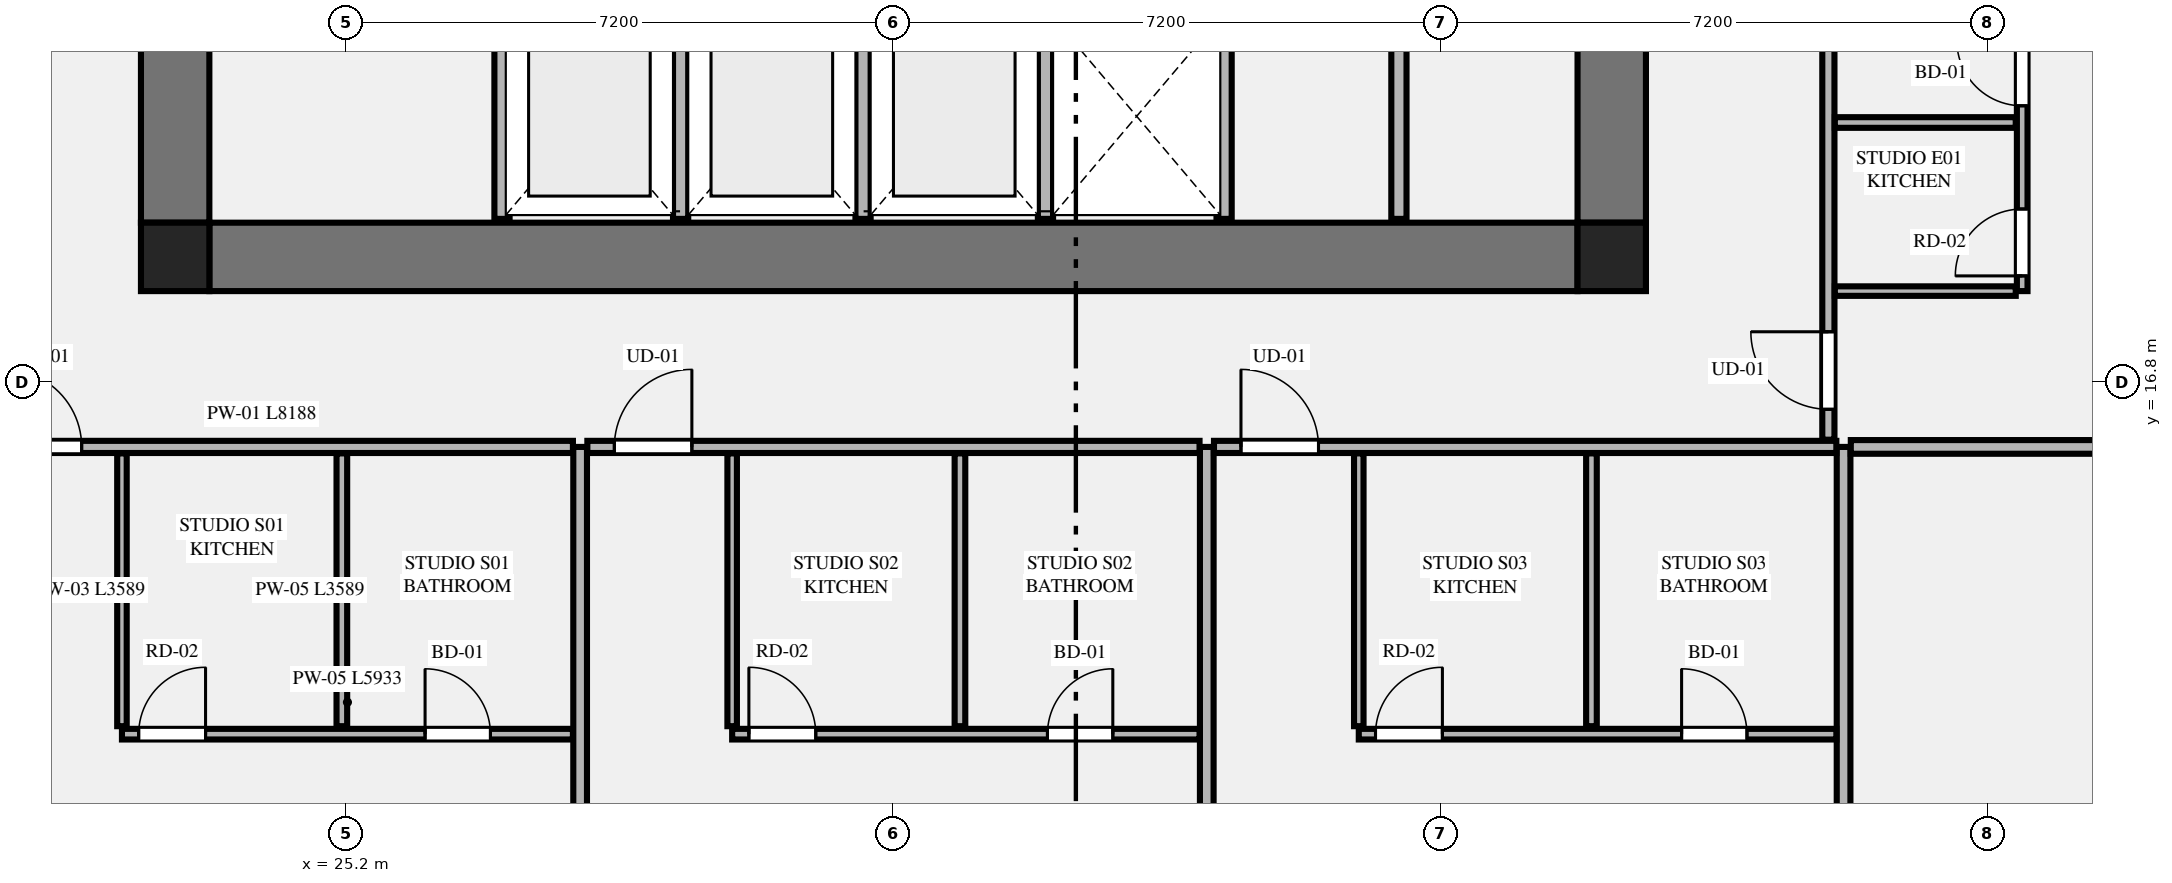
"""IFC4 building model, lengths in metres.
Left out: names, types, materials, properties, quantities, classifications, styles, units other than length and angle.
Written with IfcOpenShell. Run it as: python <this file> out.ifc"""

import sys

from ifc_helpers import new_model, si_unit, direction, frame, frame_2d, origin, origin_2d, place, context, subcontext, project, spatial, rectangle, extrude, element, fill, save


model = new_model("IFC4")
c1 = context("Model", 3, precision=1e-05, world=origin(), true_north=direction((0.0, 1.0)))
c2 = subcontext(c1, "Body", "Model", "MODEL_VIEW")
j1 = project(units=[si_unit("LENGTHUNIT", "METRE"), si_unit("PLANEANGLEUNIT", "RADIAN")], contexts=[c1])
p1 = place(None, origin())
s1 = spatial("IfcSite", under=j1, at=p1, CompositionType="ELEMENT")
p2 = place(p1, origin())
s2 = spatial("IfcBuilding", under=s1, at=p2, CompositionType="ELEMENT")
p3 = place(p2, frame((0.0, 0.0, 24.9)))
s3 = spatial("IfcBuildingStorey", under=s2, at=p3, CompositionType="ELEMENT", Elevation=24.9)
for number, where, z_axis, x_axis in (
    (1, (22.95, 18.45, 0.0), (0.0, 0.0, 1.0), (1.0, 0.0, 0.0)),
    (2, (41.85, 18.45, 0.0), (0.0, 0.0, 1.0), (1.0, 0.0, 0.0)),
):
    element("IfcColumn", number, at=place(p3, frame(where, z_axis=z_axis, x_axis=x_axis)), inside=s3, PredefinedType="COLUMN", context=c2, shape_type="SweptSolid", body=[
        extrude(rectangle(XDim=0.9, YDim=0.9, at=origin_2d()), origin(), (0.0, 0.0, 1.0), 3.55),
    ])
p4 = place(p3, frame((23.4, 18.45, 0.0), z_axis=(0.0, 0.0, 1.0), x_axis=(1.0, 0.0, 0.0)))
e3 = element("IfcWall", 3, at=p4, inside=s3, PredefinedType="SHEAR", context=c2, shape_type="SweptSolid", body=[
    extrude(rectangle(XDim=18.0, YDim=0.9, at=frame_2d((9.0, 0.0))), origin(), (0.0, 0.0, 1.0), 3.33),
])
p5 = place(p3, frame((22.95, 18.9, 0.0), z_axis=(0.0, 0.0, 1.0), x_axis=(0.0, 1.0, 0.0)))
e4 = element("IfcWall", 4, at=p5, inside=s3, PredefinedType="SHEAR", context=c2, shape_type="SweptSolid", body=[
    extrude(rectangle(XDim=14.0, YDim=0.9, at=frame_2d((7.0, 0.0))), origin(), (0.0, 0.0, 1.0), 3.33),
])
p6 = place(p5, frame((2.94, 0.0, 0.0)))
e5 = element("IfcOpeningElement", 5, at=p6, cuts=e4, PredefinedType="OPENING", context=c2, shape_type="SweptSolid", body=[
    extrude(rectangle(XDim=1.22, YDim=2.25, at=frame_2d((0.61, 1.125))), frame((0.0, 0.46, 0.0), z_axis=(0.0, -1.0, 0.0), x_axis=(1.0, 0.0, 0.0)), (0.0, 0.0, 1.0), 0.92),
])
p7 = place(p3, frame((41.85, 18.9, 0.0), z_axis=(0.0, 0.0, 1.0), x_axis=(0.0, 1.0, 0.0)))
e6 = element("IfcWall", 6, at=p7, inside=s3, PredefinedType="SHEAR", context=c2, shape_type="SweptSolid", body=[
    extrude(rectangle(XDim=14.0, YDim=0.9, at=frame_2d((7.0, 0.0))), origin(), (0.0, 0.0, 1.0), 3.33),
])
p8 = place(p7, frame((2.94, 0.0, 0.0)))
e7 = element("IfcOpeningElement", 7, at=p8, cuts=e6, PredefinedType="OPENING", context=c2, shape_type="SweptSolid", body=[
    extrude(rectangle(XDim=1.22, YDim=2.25, at=frame_2d((0.61, 1.125))), frame((0.0, 0.46, 0.0), z_axis=(0.0, -1.0, 0.0), x_axis=(1.0, 0.0, 0.0)), (0.0, 0.0, 1.0), 0.92),
])
for number, where, z_axis, x_axis in (
    (8, (27.25, 18.95, 0.0), (0.0, 0.0, 1.0), (0.0, 1.0, 0.0)),
    (9, (29.6, 18.95, 0.0), (0.0, 0.0, 1.0), (0.0, 1.0, 0.0)),
    (10, (32.0, 18.95, 0.0), (0.0, 0.0, 1.0), (0.0, 1.0, 0.0)),
    (11, (34.4, 18.95, 0.0), (0.0, 0.0, 1.0), (0.0, 1.0, 0.0)),
    (12, (36.75, 18.95, 0.0), (0.0, 0.0, 1.0), (0.0, 1.0, 0.0)),
    (13, (39.05, 18.95, 0.0), (0.0, 0.0, 1.0), (0.0, 1.0, 0.0)),
):
    element("IfcWall", number, at=place(p3, frame(where, z_axis=z_axis, x_axis=x_axis)), inside=s3, PredefinedType="PLUMBINGWALL", context=c2, shape_type="SweptSolid", body=[
        extrude(rectangle(XDim=2.73, YDim=0.2, at=frame_2d((1.365, 0.0))), origin(), (0.0, 0.0, 1.0), 3.33),
    ])
for number, where, z_axis, x_axis in (
    (14, (28.278, 2.455, 0.0), (0.0, 0.0, 1.0), (0.0, 1.0, 0.0)),
    (15, (36.522, 2.455, 0.0), (0.0, 0.0, 1.0), (0.0, 1.0, 0.0)),
):
    element("IfcWall", number, at=place(p3, frame(where, z_axis=z_axis, x_axis=x_axis)), inside=s3, PredefinedType="PARTITIONING", context=c2, shape_type="SweptSolid", body=[
        extrude(rectangle(XDim=13.495, YDim=0.18, at=frame_2d((6.748, 0.0))), origin(), (0.0, 0.0, 1.0), 2.637),
    ])
p9 = place(p3, frame((44.9, 2.455, 0.0), z_axis=(0.0, 0.0, 1.0), x_axis=(0.0, 1.0, 0.0)))
e16 = element("IfcWall", 16, at=p9, inside=s3, PredefinedType="PARTITIONING", context=c2, shape_type="SweptSolid", body=[
    extrude(rectangle(XDim=13.495, YDim=0.18, at=frame_2d((6.748, 0.0))), origin(), (0.0, 0.0, 1.0), 3.33),
])
p10 = place(p3, frame((19.995, 15.95, 0.0), z_axis=(0.0, 0.0, 1.0), x_axis=(1.0, 0.0, 0.0)))
e17 = element("IfcWall", 17, at=p10, inside=s3, PredefinedType="PARTITIONING", context=c2, shape_type="SweptSolid", body=[
    extrude(rectangle(XDim=8.188, YDim=0.16, at=frame_2d((4.094, 0.0))), origin(), (0.0, 0.0, 1.0), 3.33),
])
p11 = place(p10, frame((0.705, 0.0, 0.0)))
e18 = element("IfcOpeningElement", 18, at=p11, cuts=e17, PredefinedType="OPENING", context=c2, shape_type="SweptSolid", body=[
    extrude(rectangle(XDim=1.02, YDim=2.25, at=frame_2d((0.51, 1.125))), frame((0.0, 0.09, 0.0), z_axis=(0.0, -1.0, 0.0), x_axis=(1.0, 0.0, 0.0)), (0.0, 0.0, 1.0), 0.18),
])
p12 = place(p3, frame((22.25, 12.276, 0.0), z_axis=(0.0, 0.0, 1.0), x_axis=(0.0, 1.0, 0.0)))
e19 = element("IfcWall", 19, at=p12, inside=s3, PredefinedType="PARTITIONING", context=c2, shape_type="SweptSolid", body=[
    extrude(rectangle(XDim=3.589, YDim=0.125, at=frame_2d((1.794, 0.0))), origin(), (0.0, 0.0, 1.0), 2.637),
])
p13 = place(p3, frame((22.25, 12.171, 0.0), z_axis=(0.0, 0.0, 1.0), x_axis=(1.0, 0.0, 0.0)))
e20 = element("IfcWall", 20, at=p13, inside=s3, PredefinedType="PLUMBINGWALL", context=c2, shape_type="SweptSolid", body=[
    extrude(rectangle(XDim=5.933, YDim=0.14, at=frame_2d((2.967, 0.0))), origin(), (0.0, 0.0, 1.0), 3.33),
])
p14 = place(p13, frame((3.988, 0.0, 0.0)))
e21 = element("IfcOpeningElement", 21, at=p14, cuts=e20, PredefinedType="OPENING", context=c2, shape_type="SweptSolid", body=[
    extrude(rectangle(XDim=0.86, YDim=2.1, at=frame_2d((0.43, 1.05))), frame((0.0, 0.08, 0.0), z_axis=(0.0, -1.0, 0.0), x_axis=(1.0, 0.0, 0.0)), (0.0, 0.0, 1.0), 0.16),
])
p15 = place(p13, frame((0.22, 0.0, 0.0)))
e22 = element("IfcOpeningElement", 22, at=p15, cuts=e20, PredefinedType="OPENING", context=c2, shape_type="SweptSolid", body=[
    extrude(rectangle(XDim=0.88, YDim=2.15, at=frame_2d((0.44, 1.075))), frame((0.0, 0.08, 0.0), z_axis=(0.0, -1.0, 0.0), x_axis=(1.0, 0.0, 0.0)), (0.0, 0.0, 1.0), 0.16),
])
p16 = place(p3, frame((25.143, 12.276, 0.0), z_axis=(0.0, 0.0, 1.0), x_axis=(0.0, 1.0, 0.0)))
e23 = element("IfcWall", 23, at=p16, inside=s3, PredefinedType="PLUMBINGWALL", context=c2, shape_type="SweptSolid", body=[
    extrude(rectangle(XDim=3.589, YDim=0.14, at=frame_2d((1.794, 0.0))), origin(), (0.0, 0.0, 1.0), 3.33),
])
p17 = place(p3, frame((28.373, 15.95, 0.0), z_axis=(0.0, 0.0, 1.0), x_axis=(1.0, 0.0, 0.0)))
e24 = element("IfcWall", 24, at=p17, inside=s3, PredefinedType="PARTITIONING", context=c2, shape_type="SweptSolid", body=[
    extrude(rectangle(XDim=8.054, YDim=0.16, at=frame_2d((4.027, 0.0))), origin(), (0.0, 0.0, 1.0), 3.33),
])
p18 = place(p17, frame((0.355, 0.0, 0.0)))
e25 = element("IfcOpeningElement", 25, at=p18, cuts=e24, PredefinedType="OPENING", context=c2, shape_type="SweptSolid", body=[
    extrude(rectangle(XDim=1.02, YDim=2.25, at=frame_2d((0.51, 1.125))), frame((0.0, 0.09, 0.0), z_axis=(0.0, -1.0, 0.0), x_axis=(1.0, 0.0, 0.0)), (0.0, 0.0, 1.0), 0.18),
])
p19 = place(p3, frame((30.278, 12.276, 0.0), z_axis=(0.0, 0.0, 1.0), x_axis=(0.0, 1.0, 0.0)))
e26 = element("IfcWall", 26, at=p19, inside=s3, PredefinedType="PARTITIONING", context=c2, shape_type="SweptSolid", body=[
    extrude(rectangle(XDim=3.589, YDim=0.125, at=frame_2d((1.794, 0.0))), origin(), (0.0, 0.0, 1.0), 3.33),
])
p20 = place(p3, frame((30.278, 12.171, 0.0), z_axis=(0.0, 0.0, 1.0), x_axis=(1.0, 0.0, 0.0)))
e27 = element("IfcWall", 27, at=p20, inside=s3, PredefinedType="PLUMBINGWALL", context=c2, shape_type="SweptSolid", body=[
    extrude(rectangle(XDim=6.149, YDim=0.14, at=frame_2d((3.074, 0.0))), origin(), (0.0, 0.0, 1.0), 3.33),
])
p21 = place(p20, frame((4.148, 0.0, 0.0)))
e28 = element("IfcOpeningElement", 28, at=p21, cuts=e27, PredefinedType="OPENING", context=c2, shape_type="SweptSolid", body=[
    extrude(rectangle(XDim=0.86, YDim=2.1, at=frame_2d((0.43, 1.05))), frame((0.0, 0.08, 0.0), z_axis=(0.0, -1.0, 0.0), x_axis=(1.0, 0.0, 0.0)), (0.0, 0.0, 1.0), 0.16),
])
p22 = place(p20, frame((0.22, 0.0, 0.0)))
e29 = element("IfcOpeningElement", 29, at=p22, cuts=e27, PredefinedType="OPENING", context=c2, shape_type="SweptSolid", body=[
    extrude(rectangle(XDim=0.88, YDim=2.15, at=frame_2d((0.44, 1.075))), frame((0.0, 0.08, 0.0), z_axis=(0.0, -1.0, 0.0), x_axis=(1.0, 0.0, 0.0)), (0.0, 0.0, 1.0), 0.16),
])
p23 = place(p3, frame((33.275, 12.276, 0.0), z_axis=(0.0, 0.0, 1.0), x_axis=(0.0, 1.0, 0.0)))
e30 = element("IfcWall", 30, at=p23, inside=s3, PredefinedType="PLUMBINGWALL", context=c2, shape_type="SweptSolid", body=[
    extrude(rectangle(XDim=3.589, YDim=0.14, at=frame_2d((1.794, 0.0))), origin(), (0.0, 0.0, 1.0), 3.33),
])
p24 = place(p3, frame((36.617, 15.95, 0.0), z_axis=(0.0, 0.0, 1.0), x_axis=(1.0, 0.0, 0.0)))
e31 = element("IfcWall", 31, at=p24, inside=s3, PredefinedType="PARTITIONING", context=c2, shape_type="SweptSolid", body=[
    extrude(rectangle(XDim=8.188, YDim=0.16, at=frame_2d((4.094, 0.0))), origin(), (0.0, 0.0, 1.0), 3.33),
])
p25 = place(p24, frame((0.355, 0.0, 0.0)))
e32 = element("IfcOpeningElement", 32, at=p25, cuts=e31, PredefinedType="OPENING", context=c2, shape_type="SweptSolid", body=[
    extrude(rectangle(XDim=1.02, YDim=2.25, at=frame_2d((0.51, 1.125))), frame((0.0, 0.09, 0.0), z_axis=(0.0, -1.0, 0.0), x_axis=(1.0, 0.0, 0.0)), (0.0, 0.0, 1.0), 0.18),
])
p26 = place(p3, frame((38.522, 12.276, 0.0), z_axis=(0.0, 0.0, 1.0), x_axis=(0.0, 1.0, 0.0)))
e33 = element("IfcWall", 33, at=p26, inside=s3, PredefinedType="PARTITIONING", context=c2, shape_type="SweptSolid", body=[
    extrude(rectangle(XDim=3.589, YDim=0.125, at=frame_2d((1.794, 0.0))), origin(), (0.0, 0.0, 1.0), 3.33),
])
p27 = place(p3, frame((38.522, 12.171, 0.0), z_axis=(0.0, 0.0, 1.0), x_axis=(1.0, 0.0, 0.0)))
e34 = element("IfcWall", 34, at=p27, inside=s3, PredefinedType="PLUMBINGWALL", context=c2, shape_type="SweptSolid", body=[
    extrude(rectangle(XDim=6.283, YDim=0.14, at=frame_2d((3.142, 0.0))), origin(), (0.0, 0.0, 1.0), 3.33),
])
p28 = place(p27, frame((4.247, 0.0, 0.0)))
e35 = element("IfcOpeningElement", 35, at=p28, cuts=e34, PredefinedType="OPENING", context=c2, shape_type="SweptSolid", body=[
    extrude(rectangle(XDim=0.86, YDim=2.1, at=frame_2d((0.43, 1.05))), frame((0.0, 0.08, 0.0), z_axis=(0.0, -1.0, 0.0), x_axis=(1.0, 0.0, 0.0)), (0.0, 0.0, 1.0), 0.16),
])
p29 = place(p27, frame((0.22, 0.0, 0.0)))
e36 = element("IfcOpeningElement", 36, at=p29, cuts=e34, PredefinedType="OPENING", context=c2, shape_type="SweptSolid", body=[
    extrude(rectangle(XDim=0.88, YDim=2.15, at=frame_2d((0.44, 1.075))), frame((0.0, 0.08, 0.0), z_axis=(0.0, -1.0, 0.0), x_axis=(1.0, 0.0, 0.0)), (0.0, 0.0, 1.0), 0.16),
])
p30 = place(p3, frame((41.583, 12.276, 0.0), z_axis=(0.0, 0.0, 1.0), x_axis=(0.0, 1.0, 0.0)))
e37 = element("IfcWall", 37, at=p30, inside=s3, PredefinedType="PLUMBINGWALL", context=c2, shape_type="SweptSolid", body=[
    extrude(rectangle(XDim=3.589, YDim=0.14, at=frame_2d((1.794, 0.0))), origin(), (0.0, 0.0, 1.0), 3.33),
])
p31 = place(p3, frame((44.995, 15.95, 0.0), z_axis=(0.0, 0.0, 1.0), x_axis=(1.0, 0.0, 0.0)))
e38 = element("IfcWall", 38, at=p31, inside=s3, PredefinedType="PARTITIONING", context=c2, shape_type="SweptSolid", body=[
    extrude(rectangle(XDim=9.241, YDim=0.18, at=frame_2d((4.621, 0.0))), origin(), (0.0, 0.0, 1.0), 3.33),
])
p32 = place(p3, frame((44.7, 16.045, 0.0), z_axis=(0.0, 0.0, 1.0), x_axis=(0.0, 1.0, 0.0)))
e39 = element("IfcWall", 39, at=p32, inside=s3, PredefinedType="PARTITIONING", context=c2, shape_type="SweptSolid", body=[
    extrude(rectangle(XDim=6.576, YDim=0.16, at=frame_2d((3.288, 0.0))), origin(), (0.0, 0.0, 1.0), 3.33),
])
p33 = place(p32, frame((0.4, 0.0, 0.0)))
e40 = element("IfcOpeningElement", 40, at=p33, cuts=e39, PredefinedType="OPENING", context=c2, shape_type="SweptSolid", body=[
    extrude(rectangle(XDim=1.02, YDim=2.25, at=frame_2d((0.51, 1.125))), frame((0.0, 0.09, 0.0), z_axis=(0.0, -1.0, 0.0), x_axis=(1.0, 0.0, 0.0)), (0.0, 0.0, 1.0), 0.18),
])
p34 = place(p3, frame((44.785, 18.0, 0.0), z_axis=(0.0, 0.0, 1.0), x_axis=(1.0, 0.0, 0.0)))
e41 = element("IfcWall", 41, at=p34, inside=s3, PredefinedType="PARTITIONING", context=c2, shape_type="SweptSolid", body=[
    extrude(rectangle(XDim=2.38, YDim=0.125, at=frame_2d((1.19, 0.0))), origin(), (0.0, 0.0, 1.0), 2.637),
])
p35 = place(p3, frame((47.25, 18.0, 0.0), z_axis=(0.0, 0.0, 1.0), x_axis=(0.0, 1.0, 0.0)))
e42 = element("IfcWall", 42, at=p35, inside=s3, PredefinedType="PLUMBINGWALL", context=c2, shape_type="SweptSolid", body=[
    extrude(rectangle(XDim=4.621, YDim=0.14, at=frame_2d((2.311, 0.0))), origin(), (0.0, 0.0, 1.0), 3.33),
])
p36 = place(p35, frame((2.438, 0.0, 0.0)))
e43 = element("IfcOpeningElement", 43, at=p36, cuts=e42, PredefinedType="OPENING", context=c2, shape_type="SweptSolid", body=[
    extrude(rectangle(XDim=0.86, YDim=2.1, at=frame_2d((0.43, 1.05))), frame((0.0, 0.08, 0.0), z_axis=(0.0, -1.0, 0.0), x_axis=(1.0, 0.0, 0.0)), (0.0, 0.0, 1.0), 0.16),
])
p37 = place(p35, frame((0.2, 0.0, 0.0)))
e44 = element("IfcOpeningElement", 44, at=p37, cuts=e42, PredefinedType="OPENING", context=c2, shape_type="SweptSolid", body=[
    extrude(rectangle(XDim=0.88, YDim=2.15, at=frame_2d((0.44, 1.075))), frame((0.0, 0.08, 0.0), z_axis=(0.0, -1.0, 0.0), x_axis=(1.0, 0.0, 0.0)), (0.0, 0.0, 1.0), 0.16),
])
p38 = place(p3, frame((44.785, 20.218, 0.0), z_axis=(0.0, 0.0, 1.0), x_axis=(1.0, 0.0, 0.0)))
e45 = element("IfcWall", 45, at=p38, inside=s3, PredefinedType="PLUMBINGWALL", context=c2, shape_type="SweptSolid", body=[
    extrude(rectangle(XDim=2.38, YDim=0.14, at=frame_2d((1.19, 0.0))), origin(), (0.0, 0.0, 1.0), 3.33),
])
p39 = place(p14, origin())
e46 = element("IfcDoor", 46, at=p39, inside=s3, OperationType="SINGLE_SWING_LEFT", PredefinedType="DOOR", context=c2, shape_type="SweptSolid", body=[
    extrude(rectangle(XDim=0.86, YDim=2.1, at=frame_2d((0.43, 1.05))), frame((0.0, 0.025, 0.0), z_axis=(0.0, -1.0, 0.0), x_axis=(1.0, 0.0, 0.0)), (0.0, 0.0, 1.0), 0.05),
])
fill(e21, e46)
p40 = place(p11, origin())
e47 = element("IfcDoor", 47, at=p40, inside=s3, OperationType="SINGLE_SWING_LEFT", PredefinedType="DOOR", context=c2, shape_type="SweptSolid", body=[
    extrude(rectangle(XDim=1.02, YDim=2.25, at=frame_2d((0.51, 1.125))), frame((0.0, 0.025, 0.0), z_axis=(0.0, -1.0, 0.0), x_axis=(1.0, 0.0, 0.0)), (0.0, 0.0, 1.0), 0.05),
])
fill(e18, e47)
p41 = place(p15, origin())
e48 = element("IfcDoor", 48, at=p41, inside=s3, OperationType="SINGLE_SWING_RIGHT", PredefinedType="DOOR", context=c2, shape_type="SweptSolid", body=[
    extrude(rectangle(XDim=0.88, YDim=2.15, at=frame_2d((0.44, 1.075))), frame((0.0, 0.025, 0.0), z_axis=(0.0, -1.0, 0.0), x_axis=(1.0, 0.0, 0.0)), (0.0, 0.0, 1.0), 0.05),
])
fill(e22, e48)
p42 = place(p21, origin())
e49 = element("IfcDoor", 49, at=p42, inside=s3, OperationType="SINGLE_SWING_RIGHT", PredefinedType="DOOR", context=c2, shape_type="SweptSolid", body=[
    extrude(rectangle(XDim=0.86, YDim=2.1, at=frame_2d((0.43, 1.05))), frame((0.0, 0.025, 0.0), z_axis=(0.0, -1.0, 0.0), x_axis=(1.0, 0.0, 0.0)), (0.0, 0.0, 1.0), 0.05),
])
fill(e28, e49)
p43 = place(p18, origin())
e50 = element("IfcDoor", 50, at=p43, inside=s3, OperationType="SINGLE_SWING_RIGHT", PredefinedType="DOOR", context=c2, shape_type="SweptSolid", body=[
    extrude(rectangle(XDim=1.02, YDim=2.25, at=frame_2d((0.51, 1.125))), frame((0.0, 0.025, 0.0), z_axis=(0.0, -1.0, 0.0), x_axis=(1.0, 0.0, 0.0)), (0.0, 0.0, 1.0), 0.05),
])
fill(e25, e50)
p44 = place(p22, origin())
e51 = element("IfcDoor", 51, at=p44, inside=s3, OperationType="SINGLE_SWING_LEFT", PredefinedType="DOOR", context=c2, shape_type="SweptSolid", body=[
    extrude(rectangle(XDim=0.88, YDim=2.15, at=frame_2d((0.44, 1.075))), frame((0.0, 0.025, 0.0), z_axis=(0.0, -1.0, 0.0), x_axis=(1.0, 0.0, 0.0)), (0.0, 0.0, 1.0), 0.05),
])
fill(e29, e51)
p45 = place(p28, origin())
e52 = element("IfcDoor", 52, at=p45, inside=s3, OperationType="SINGLE_SWING_LEFT", PredefinedType="DOOR", context=c2, shape_type="SweptSolid", body=[
    extrude(rectangle(XDim=0.86, YDim=2.1, at=frame_2d((0.43, 1.05))), frame((0.0, 0.025, 0.0), z_axis=(0.0, -1.0, 0.0), x_axis=(1.0, 0.0, 0.0)), (0.0, 0.0, 1.0), 0.05),
])
fill(e35, e52)
p46 = place(p25, origin())
e53 = element("IfcDoor", 53, at=p46, inside=s3, OperationType="SINGLE_SWING_LEFT", PredefinedType="DOOR", context=c2, shape_type="SweptSolid", body=[
    extrude(rectangle(XDim=1.02, YDim=2.25, at=frame_2d((0.51, 1.125))), frame((0.0, 0.025, 0.0), z_axis=(0.0, -1.0, 0.0), x_axis=(1.0, 0.0, 0.0)), (0.0, 0.0, 1.0), 0.05),
])
fill(e32, e53)
p47 = place(p29, origin())
e54 = element("IfcDoor", 54, at=p47, inside=s3, OperationType="SINGLE_SWING_RIGHT", PredefinedType="DOOR", context=c2, shape_type="SweptSolid", body=[
    extrude(rectangle(XDim=0.88, YDim=2.15, at=frame_2d((0.44, 1.075))), frame((0.0, 0.025, 0.0), z_axis=(0.0, -1.0, 0.0), x_axis=(1.0, 0.0, 0.0)), (0.0, 0.0, 1.0), 0.05),
])
fill(e36, e54)
p48 = place(p36, origin())
e55 = element("IfcDoor", 55, at=p48, inside=s3, OperationType="SINGLE_SWING_RIGHT", PredefinedType="DOOR", context=c2, shape_type="SweptSolid", body=[
    extrude(rectangle(XDim=0.86, YDim=2.1, at=frame_2d((0.43, 1.05))), frame((0.0, 0.025, 0.0), z_axis=(0.0, -1.0, 0.0), x_axis=(1.0, 0.0, 0.0)), (0.0, 0.0, 1.0), 0.05),
])
fill(e43, e55)
p49 = place(p33, origin())
e56 = element("IfcDoor", 56, at=p49, inside=s3, OperationType="SINGLE_SWING_RIGHT", PredefinedType="DOOR", context=c2, shape_type="SweptSolid", body=[
    extrude(rectangle(XDim=1.02, YDim=2.25, at=frame_2d((0.51, 1.125))), frame((0.0, 0.025, 0.0), z_axis=(0.0, -1.0, 0.0), x_axis=(1.0, 0.0, 0.0)), (0.0, 0.0, 1.0), 0.05),
])
fill(e40, e56)
p50 = place(p37, origin())
e57 = element("IfcDoor", 57, at=p50, inside=s3, OperationType="SINGLE_SWING_LEFT", PredefinedType="DOOR", context=c2, shape_type="SweptSolid", body=[
    extrude(rectangle(XDim=0.88, YDim=2.15, at=frame_2d((0.44, 1.075))), frame((0.0, 0.025, 0.0), z_axis=(0.0, -1.0, 0.0), x_axis=(1.0, 0.0, 0.0)), (0.0, 0.0, 1.0), 0.05),
])
fill(e44, e57)
save(model, sys.argv[1])
